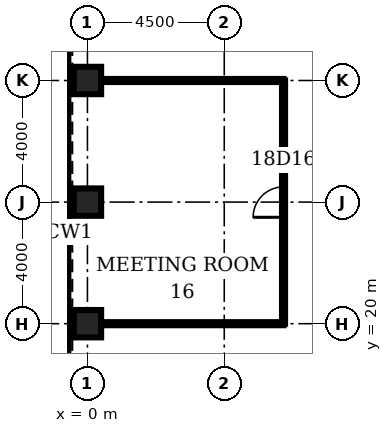
"""IFC4 building model, lengths in metres.
Left out: names, types, materials, properties, quantities, classifications, styles, units other than length and angle.
Written with IfcOpenShell. Run it as: python <this file> out.ifc"""

import sys

from ifc_helpers import new_model, si_unit, direction, frame, frame_2d, origin, origin_2d, place, context, subcontext, project, spatial, rectangle, hollow_rectangle, extrude, element, fill, save


model = new_model("IFC4")
c1 = context("Model", 3, precision=1e-05, world=origin(), true_north=direction((0.0, 1.0)))
c2 = subcontext(c1, "Body", "Model", "MODEL_VIEW")
j1 = project(units=[si_unit("LENGTHUNIT", "METRE"), si_unit("PLANEANGLEUNIT", "RADIAN")], contexts=[c1])
p1 = place(None, origin())
s1 = spatial("IfcSite", under=j1, at=p1, CompositionType="ELEMENT")
p2 = place(p1, origin())
s2 = spatial("IfcBuilding", under=s1, at=p2, CompositionType="ELEMENT")
p3 = place(p2, frame((0.0, 0.0, 86.0)))
s3 = spatial("IfcBuildingStorey", under=s2, at=p3, CompositionType="ELEMENT", Elevation=86.0)
for number, where, z_axis, x_axis in (
    (1, (0.0, 28.0, 0.0), (0.0, 0.0, 1.0), (1.0, 0.0, 0.0)),
    (2, (0.0, 24.0, 0.0), (0.0, 0.0, 1.0), (1.0, 0.0, 0.0)),
    (3, (0.0, 20.0, 0.0), (0.0, 0.0, 1.0), (1.0, 0.0, 0.0)),
):
    element("IfcColumn", number, at=place(p3, frame(where, z_axis=z_axis, x_axis=x_axis)), inside=s3, PredefinedType="COLUMN", context=c2, shape_type="SweptSolid", body=[
        extrude(hollow_rectangle(XDim=0.9, YDim=0.9, WallThickness=0.11, at=origin_2d()), origin(), (0.0, 0.0, 1.0), 4.5),
    ])
for number, where, z_axis, x_axis in (
    (4, (0.45, 20.0, 0.0), (0.0, 0.0, 1.0), (1.0, 0.0, 0.0)),
    (5, (0.45, 28.0, 0.0), (0.0, 0.0, 1.0), (1.0, 0.0, 0.0)),
):
    element("IfcWall", number, at=place(p3, frame(where, z_axis=z_axis, x_axis=x_axis)), inside=s3, PredefinedType="PARTITIONING", context=c2, shape_type="SweptSolid", body=[
        extrude(rectangle(XDim=6.0, YDim=0.1, at=frame_2d((3.0, 0.0))), origin(), (0.0, 0.0, 1.0), 3.0),
    ])
p4 = place(p3, frame((6.45, 20.0, 0.0), z_axis=(0.0, 0.0, 1.0), x_axis=(0.0, 1.0, 0.0)))
e6 = element("IfcWall", 6, at=p4, inside=s3, PredefinedType="PARTITIONING", context=c2, shape_type="SweptSolid", body=[
    extrude(rectangle(XDim=8.0, YDim=0.1, at=frame_2d((4.0, 0.0))), origin(), (0.0, 0.0, 1.0), 3.0),
])
p5 = place(p4, frame((3.5, 0.0, 0.0)))
e7 = element("IfcOpeningElement", 7, at=p5, cuts=e6, PredefinedType="OPENING", context=c2, shape_type="SweptSolid", body=[
    extrude(rectangle(XDim=1.0, YDim=2.1, at=frame_2d((0.5, 1.05))), frame((0.0, 0.06, 0.0), z_axis=(0.0, -1.0, 0.0), x_axis=(1.0, 0.0, 0.0)), (0.0, 0.0, 1.0), 0.12),
])
p6 = place(p5, origin())
e8 = element("IfcDoor", 8, at=p6, inside=s3, OperationType="SINGLE_SWING_LEFT", PredefinedType="DOOR", context=c2, shape_type="SweptSolid", body=[
    extrude(rectangle(XDim=1.0, YDim=2.1, at=frame_2d((0.5, 1.05))), frame((0.0, 0.025, 0.0), z_axis=(0.0, -1.0, 0.0), x_axis=(1.0, 0.0, 0.0)), (0.0, 0.0, 1.0), 0.05),
])
fill(e7, e8)
save(model, sys.argv[1])
